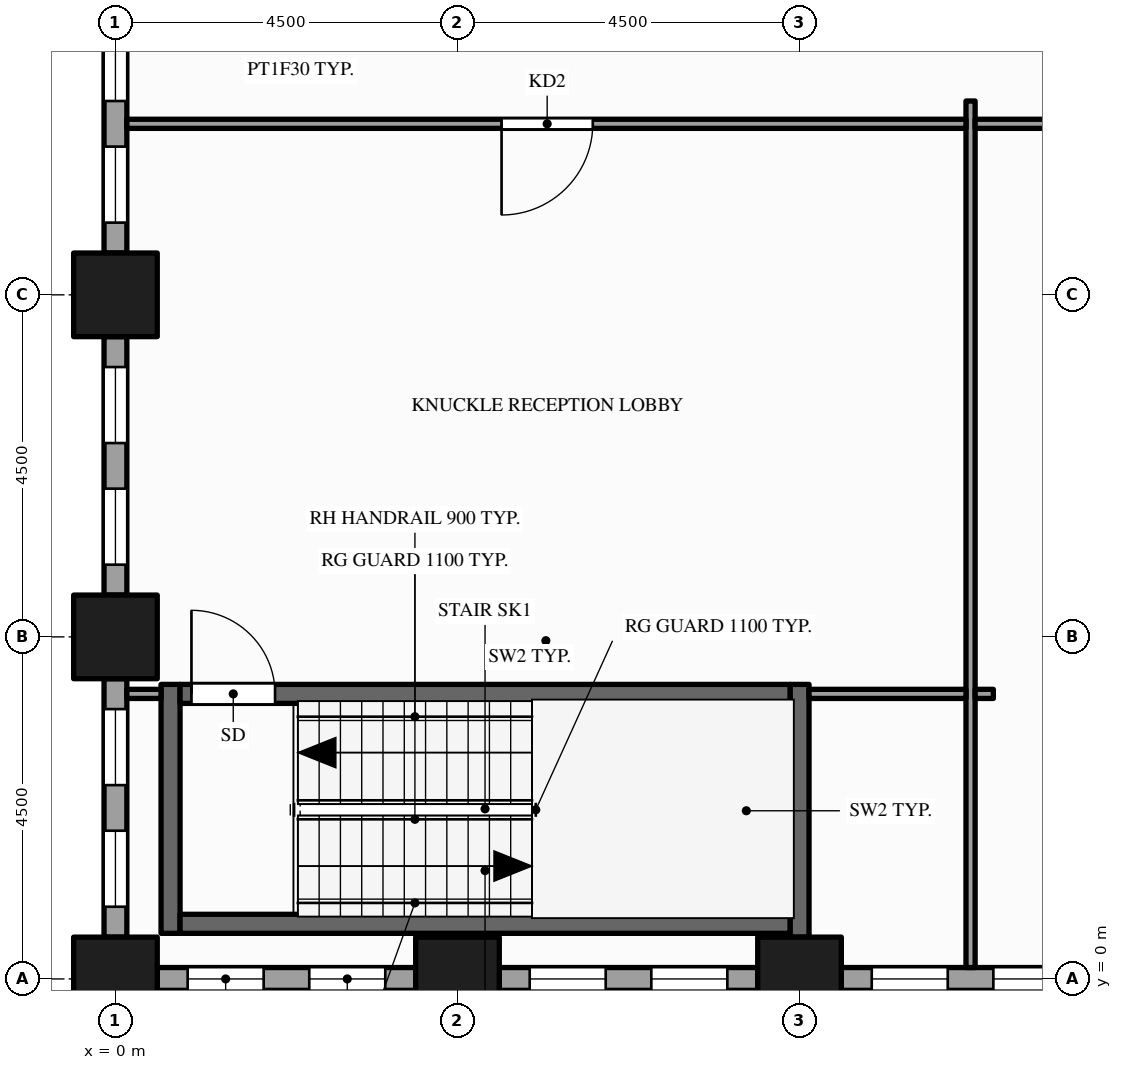
"""IFC4 building model, lengths in metres.
Left out: names, types, materials, properties, quantities, classifications, styles, units other than length and angle.
Written with IfcOpenShell. Run it as: python <this file> out.ifc"""

import sys

from ifc_helpers import new_model, si_unit, direction, frame, frame_2d, origin, origin_2d, place, context, subcontext, project, spatial, rectangle, hollow_rectangle, extrude, element, fill, save


model = new_model("IFC4")
c1 = context("Model", 3, precision=1e-05, world=origin(), true_north=direction((0.0, 1.0)))
c2 = subcontext(c1, "Body", "Model", "MODEL_VIEW")
j1 = project(units=[si_unit("LENGTHUNIT", "METRE"), si_unit("PLANEANGLEUNIT", "RADIAN")], contexts=[c1])
p1 = place(None, origin())
s1 = spatial("IfcSite", under=j1, at=p1, CompositionType="ELEMENT")
p2 = place(p1, origin())
s2 = spatial("IfcBuilding", under=s1, at=p2, CompositionType="ELEMENT")
p3 = place(p2, frame((0.0, 0.0, 41.0)))
s3 = spatial("IfcBuildingStorey", under=s2, at=p3, CompositionType="ELEMENT", Elevation=41.0)
for number, where, z_axis, x_axis in (
    (1, (0.0, 0.0, -0.15), (0.0, 0.0, 1.0), (1.0, 0.0, 0.0)),
    (2, (0.0, 4.5, -0.15), (0.0, 0.0, 1.0), (1.0, 0.0, 0.0)),
    (3, (0.0, 9.0, -0.15), (0.0, 0.0, 1.0), (1.0, 0.0, 0.0)),
    (4, (4.5, 0.0, -0.15), (0.0, 0.0, 1.0), (1.0, 0.0, 0.0)),
    (5, (9.0, 0.0, -0.15), (0.0, 0.0, 1.0), (1.0, 0.0, 0.0)),
):
    element("IfcColumn", number, at=place(p3, frame(where, z_axis=z_axis, x_axis=x_axis)), inside=s3, PredefinedType="COLUMN", context=c2, shape_type="SweptSolid", body=[
        extrude(hollow_rectangle(XDim=1.1, YDim=1.1, WallThickness=0.06, at=origin_2d()), origin(), (0.0, 0.0, 1.0), 4.0),
    ])
p4 = place(p3, frame((0.55, 0.0, 0.0), z_axis=(0.0, 0.0, 1.0), x_axis=(1.0, 0.0, 0.0)))
e6 = element("IfcWall", 6, at=p4, inside=s3, PredefinedType="STANDARD", context=c2, shape_type="SweptSolid", body=[
    extrude(rectangle(XDim=3.4, YDim=0.3, at=frame_2d((1.7, 0.0))), origin(), (0.0, 0.0, 1.0), 3.144),
])
p5 = place(p4, frame((0.4, 0.0, 0.9)))
e7 = element("IfcOpeningElement", 7, at=p5, cuts=e6, PredefinedType="OPENING", context=c2, shape_type="SweptSolid", body=[
    extrude(rectangle(XDim=1.0, YDim=2.0, at=frame_2d((0.5, 1.0))), frame((0.0, 0.16, 0.0), z_axis=(0.0, -1.0, 0.0), x_axis=(1.0, 0.0, 0.0)), (0.0, 0.0, 1.0), 0.32),
])
p6 = place(p4, frame((2.0, 0.0, 0.9)))
e8 = element("IfcOpeningElement", 8, at=p6, cuts=e6, PredefinedType="OPENING", context=c2, shape_type="SweptSolid", body=[
    extrude(rectangle(XDim=1.0, YDim=2.0, at=frame_2d((0.5, 1.0))), frame((0.0, 0.16, 0.0), z_axis=(0.0, -1.0, 0.0), x_axis=(1.0, 0.0, 0.0)), (0.0, 0.0, 1.0), 0.32),
])
p7 = place(p3, frame((5.05, 0.0, 0.0), z_axis=(0.0, 0.0, 1.0), x_axis=(1.0, 0.0, 0.0)))
e9 = element("IfcWall", 9, at=p7, inside=s3, PredefinedType="STANDARD", context=c2, shape_type="SweptSolid", body=[
    extrude(rectangle(XDim=3.4, YDim=0.3, at=frame_2d((1.7, 0.0))), origin(), (0.0, 0.0, 1.0), 3.144),
])
p8 = place(p7, frame((0.4, 0.0, 0.9)))
e10 = element("IfcOpeningElement", 10, at=p8, cuts=e9, PredefinedType="OPENING", context=c2, shape_type="SweptSolid", body=[
    extrude(rectangle(XDim=1.0, YDim=2.0, at=frame_2d((0.5, 1.0))), frame((0.0, 0.16, 0.0), z_axis=(0.0, -1.0, 0.0), x_axis=(1.0, 0.0, 0.0)), (0.0, 0.0, 1.0), 0.32),
])
p9 = place(p7, frame((2.0, 0.0, 0.9)))
e11 = element("IfcOpeningElement", 11, at=p9, cuts=e9, PredefinedType="OPENING", context=c2, shape_type="SweptSolid", body=[
    extrude(rectangle(XDim=1.0, YDim=2.0, at=frame_2d((0.5, 1.0))), frame((0.0, 0.16, 0.0), z_axis=(0.0, -1.0, 0.0), x_axis=(1.0, 0.0, 0.0)), (0.0, 0.0, 1.0), 0.32),
])
p10 = place(p3, frame((9.55, 0.0, 0.0), z_axis=(0.0, 0.0, 1.0), x_axis=(1.0, 0.0, 0.0)))
e12 = element("IfcWall", 12, at=p10, inside=s3, PredefinedType="STANDARD", context=c2, shape_type="SweptSolid", body=[
    extrude(rectangle(XDim=3.4, YDim=0.3, at=frame_2d((1.7, 0.0))), origin(), (0.0, 0.0, 1.0), 3.144),
])
p11 = place(p10, frame((0.4, 0.0, 0.9)))
e13 = element("IfcOpeningElement", 13, at=p11, cuts=e12, PredefinedType="OPENING", context=c2, shape_type="SweptSolid", body=[
    extrude(rectangle(XDim=1.0, YDim=2.0, at=frame_2d((0.5, 1.0))), frame((0.0, 0.16, 0.0), z_axis=(0.0, -1.0, 0.0), x_axis=(1.0, 0.0, 0.0)), (0.0, 0.0, 1.0), 0.32),
])
p12 = place(p10, frame((2.0, 0.0, 0.9)))
e14 = element("IfcOpeningElement", 14, at=p12, cuts=e12, PredefinedType="OPENING", context=c2, shape_type="SweptSolid", body=[
    extrude(rectangle(XDim=1.0, YDim=2.0, at=frame_2d((0.5, 1.0))), frame((0.0, 0.16, 0.0), z_axis=(0.0, -1.0, 0.0), x_axis=(1.0, 0.0, 0.0)), (0.0, 0.0, 1.0), 0.32),
])
p13 = place(p3, frame((0.0, 12.95, 0.0), z_axis=(0.0, 0.0, 1.0), x_axis=(0.0, -1.0, 0.0)))
e15 = element("IfcWall", 15, at=p13, inside=s3, PredefinedType="STANDARD", context=c2, shape_type="SweptSolid", body=[
    extrude(rectangle(XDim=3.4, YDim=0.3, at=frame_2d((1.7, 0.0))), origin(), (0.0, 0.0, 1.0), 3.144),
])
p14 = place(p13, frame((0.4, 0.0, 0.9)))
e16 = element("IfcOpeningElement", 16, at=p14, cuts=e15, PredefinedType="OPENING", context=c2, shape_type="SweptSolid", body=[
    extrude(rectangle(XDim=1.0, YDim=2.0, at=frame_2d((0.5, 1.0))), frame((0.0, 0.16, 0.0), z_axis=(0.0, -1.0, 0.0), x_axis=(1.0, 0.0, 0.0)), (0.0, 0.0, 1.0), 0.32),
])
p15 = place(p13, frame((2.0, 0.0, 0.9)))
e17 = element("IfcOpeningElement", 17, at=p15, cuts=e15, PredefinedType="OPENING", context=c2, shape_type="SweptSolid", body=[
    extrude(rectangle(XDim=1.0, YDim=2.0, at=frame_2d((0.5, 1.0))), frame((0.0, 0.16, 0.0), z_axis=(0.0, -1.0, 0.0), x_axis=(1.0, 0.0, 0.0)), (0.0, 0.0, 1.0), 0.32),
])
p16 = place(p3, frame((0.0, 8.45, 0.0), z_axis=(0.0, 0.0, 1.0), x_axis=(0.0, -1.0, 0.0)))
e18 = element("IfcWall", 18, at=p16, inside=s3, PredefinedType="STANDARD", context=c2, shape_type="SweptSolid", body=[
    extrude(rectangle(XDim=3.4, YDim=0.3, at=frame_2d((1.7, 0.0))), origin(), (0.0, 0.0, 1.0), 3.144),
])
p17 = place(p16, frame((0.4, 0.0, 0.9)))
e19 = element("IfcOpeningElement", 19, at=p17, cuts=e18, PredefinedType="OPENING", context=c2, shape_type="SweptSolid", body=[
    extrude(rectangle(XDim=1.0, YDim=2.0, at=frame_2d((0.5, 1.0))), frame((0.0, 0.16, 0.0), z_axis=(0.0, -1.0, 0.0), x_axis=(1.0, 0.0, 0.0)), (0.0, 0.0, 1.0), 0.32),
])
p18 = place(p16, frame((2.0, 0.0, 0.9)))
e20 = element("IfcOpeningElement", 20, at=p18, cuts=e18, PredefinedType="OPENING", context=c2, shape_type="SweptSolid", body=[
    extrude(rectangle(XDim=1.0, YDim=2.0, at=frame_2d((0.5, 1.0))), frame((0.0, 0.16, 0.0), z_axis=(0.0, -1.0, 0.0), x_axis=(1.0, 0.0, 0.0)), (0.0, 0.0, 1.0), 0.32),
])
p19 = place(p3, frame((0.0, 3.95, 0.0), z_axis=(0.0, 0.0, 1.0), x_axis=(0.0, -1.0, 0.0)))
e21 = element("IfcWall", 21, at=p19, inside=s3, PredefinedType="STANDARD", context=c2, shape_type="SweptSolid", body=[
    extrude(rectangle(XDim=3.4, YDim=0.3, at=frame_2d((1.7, 0.0))), origin(), (0.0, 0.0, 1.0), 3.144),
])
p20 = place(p19, frame((0.4, 0.0, 0.9)))
e22 = element("IfcOpeningElement", 22, at=p20, cuts=e21, PredefinedType="OPENING", context=c2, shape_type="SweptSolid", body=[
    extrude(rectangle(XDim=1.0, YDim=2.0, at=frame_2d((0.5, 1.0))), frame((0.0, 0.16, 0.0), z_axis=(0.0, -1.0, 0.0), x_axis=(1.0, 0.0, 0.0)), (0.0, 0.0, 1.0), 0.32),
])
p21 = place(p19, frame((2.0, 0.0, 0.9)))
e23 = element("IfcOpeningElement", 23, at=p21, cuts=e21, PredefinedType="OPENING", context=c2, shape_type="SweptSolid", body=[
    extrude(rectangle(XDim=1.0, YDim=2.0, at=frame_2d((0.5, 1.0))), frame((0.0, 0.16, 0.0), z_axis=(0.0, -1.0, 0.0), x_axis=(1.0, 0.0, 0.0)), (0.0, 0.0, 1.0), 0.32),
])
p22 = place(p3, frame((0.725, 0.6, 0.0), z_axis=(0.0, 0.0, 1.0), x_axis=(0.0, 1.0, 0.0)))
e24 = element("IfcWall", 24, at=p22, inside=s3, PredefinedType="SHEAR", context=c2, shape_type="SweptSolid", body=[
    extrude(rectangle(XDim=3.275, YDim=0.25, at=frame_2d((1.637, 0.0))), origin(), (0.0, 0.0, 1.0), 3.85),
])
p23 = place(p3, frame((9.0, 0.55, 0.0), z_axis=(0.0, 0.0, 1.0), x_axis=(0.0, 1.0, 0.0)))
e25 = element("IfcWall", 25, at=p23, inside=s3, PredefinedType="SHEAR", context=c2, shape_type="SweptSolid", body=[
    extrude(rectangle(XDim=3.325, YDim=0.25, at=frame_2d((1.663, 0.0))), origin(), (0.0, 0.0, 1.0), 3.85),
])
p24 = place(p3, frame((11.25, 0.15, 0.0), z_axis=(0.0, 0.0, 1.0), x_axis=(0.0, 1.0, 0.0)))
e26 = element("IfcWall", 26, at=p24, inside=s3, PredefinedType="PARTITIONING", context=c2, shape_type="SweptSolid", body=[
    extrude(rectangle(XDim=11.4, YDim=0.12, at=frame_2d((5.7, 0.0))), origin(), (0.0, 0.0, 1.0), 2.938),
])
p25 = place(p3, frame((0.85, 0.725, 0.0), z_axis=(0.0, 0.0, 1.0), x_axis=(1.0, 0.0, 0.0)))
e27 = element("IfcWall", 27, at=p25, inside=s3, PredefinedType="SHEAR", context=c2, shape_type="SweptSolid", body=[
    extrude(rectangle(XDim=8.025, YDim=0.25, at=frame_2d((4.012, 0.0))), origin(), (0.0, 0.0, 1.0), 3.85),
])
p26 = place(p3, frame((0.15, 3.75, 0.0), z_axis=(0.0, 0.0, 1.0), x_axis=(1.0, 0.0, 0.0)))
e28 = element("IfcWall", 28, at=p26, inside=s3, PredefinedType="PARTITIONING", context=c2, shape_type="SweptSolid", body=[
    extrude(rectangle(XDim=0.45, YDim=0.12, at=frame_2d((0.225, 0.0))), origin(), (0.0, 0.0, 1.0), 3.144),
])
p27 = place(p3, frame((0.85, 3.75, 0.0), z_axis=(0.0, 0.0, 1.0), x_axis=(1.0, 0.0, 0.0)))
e29 = element("IfcWall", 29, at=p27, inside=s3, PredefinedType="SHEAR", context=c2, shape_type="SweptSolid", body=[
    extrude(rectangle(XDim=8.025, YDim=0.25, at=frame_2d((4.012, 0.0))), origin(), (0.0, 0.0, 1.0), 3.85),
])
p28 = place(p27, frame((0.15, 0.0, 0.0)))
e30 = element("IfcOpeningElement", 30, at=p28, cuts=e29, PredefinedType="OPENING", context=c2, shape_type="SweptSolid", body=[
    extrude(rectangle(XDim=1.1, YDim=2.1, at=frame_2d((0.55, 1.05))), frame((0.0, 0.135, 0.0), z_axis=(0.0, -1.0, 0.0), x_axis=(1.0, 0.0, 0.0)), (0.0, 0.0, 1.0), 0.27),
])
p29 = place(p3, frame((9.125, 3.75, 0.0), z_axis=(0.0, 0.0, 1.0), x_axis=(1.0, 0.0, 0.0)))
e31 = element("IfcWall", 31, at=p29, inside=s3, PredefinedType="PARTITIONING", context=c2, shape_type="SweptSolid", body=[
    extrude(rectangle(XDim=2.065, YDim=0.12, at=frame_2d((1.032, 0.0))), origin(), (0.0, 0.0, 1.0), 2.938),
])
p30 = place(p3, frame((11.31, 3.75, 0.0), z_axis=(0.0, 0.0, 1.0), x_axis=(1.0, 0.0, 0.0)))
e32 = element("IfcWall", 32, at=p30, inside=s3, PredefinedType="PARTITIONING", context=c2, shape_type="SweptSolid", body=[
    extrude(rectangle(XDim=0.24, YDim=0.12, at=frame_2d((0.12, 0.0))), origin(), (0.0, 0.0, 1.0), 2.938),
])
p31 = place(p3, frame((0.15, 11.25, 0.0), z_axis=(0.0, 0.0, 1.0), x_axis=(1.0, 0.0, 0.0)))
e33 = element("IfcWall", 33, at=p31, inside=s3, PredefinedType="PARTITIONING", context=c2, shape_type="SweptSolid", body=[
    extrude(rectangle(XDim=11.04, YDim=0.12, at=frame_2d((5.52, 0.0))), origin(), (0.0, 0.0, 1.0), 2.938),
])
p32 = place(p31, frame((4.93, 0.0, 0.0)))
e34 = element("IfcOpeningElement", 34, at=p32, cuts=e33, PredefinedType="OPENING", context=c2, shape_type="SweptSolid", body=[
    extrude(rectangle(XDim=1.2, YDim=2.1, at=frame_2d((0.6, 1.05))), frame((0.0, 0.07, 0.0), z_axis=(0.0, -1.0, 0.0), x_axis=(1.0, 0.0, 0.0)), (0.0, 0.0, 1.0), 0.14),
])
p33 = place(p3, frame((11.31, 11.25, 0.0), z_axis=(0.0, 0.0, 1.0), x_axis=(1.0, 0.0, 0.0)))
e35 = element("IfcWall", 35, at=p33, inside=s3, PredefinedType="PARTITIONING", context=c2, shape_type="SweptSolid", body=[
    extrude(rectangle(XDim=4.38, YDim=0.12, at=frame_2d((2.19, 0.0))), origin(), (0.0, 0.0, 1.0), 2.938),
])
p34 = place(p33, frame((1.69, 0.0, 0.0)))
e36 = element("IfcOpeningElement", 36, at=p34, cuts=e35, PredefinedType="OPENING", context=c2, shape_type="SweptSolid", body=[
    extrude(rectangle(XDim=1.0, YDim=2.1, at=frame_2d((0.5, 1.05))), frame((0.0, 0.07, 0.0), z_axis=(0.0, -1.0, 0.0), x_axis=(1.0, 0.0, 0.0)), (0.0, 0.0, 1.0), 0.14),
])
p35 = place(p5, origin())
e37 = element("IfcWindow", 37, at=p35, inside=s3, PartitioningType="SINGLE_PANEL", PredefinedType="WINDOW", context=c2, shape_type="SweptSolid", body=[
    extrude(rectangle(XDim=1.0, YDim=2.0, at=frame_2d((0.5, 1.0))), frame((0.0, 0.03, 0.0), z_axis=(0.0, -1.0, 0.0), x_axis=(1.0, 0.0, 0.0)), (0.0, 0.0, 1.0), 0.06),
])
fill(e7, e37)
p36 = place(p6, origin())
e38 = element("IfcWindow", 38, at=p36, inside=s3, PartitioningType="SINGLE_PANEL", PredefinedType="WINDOW", context=c2, shape_type="SweptSolid", body=[
    extrude(rectangle(XDim=1.0, YDim=2.0, at=frame_2d((0.5, 1.0))), frame((0.0, 0.03, 0.0), z_axis=(0.0, -1.0, 0.0), x_axis=(1.0, 0.0, 0.0)), (0.0, 0.0, 1.0), 0.06),
])
fill(e8, e38)
p37 = place(p8, origin())
e39 = element("IfcWindow", 39, at=p37, inside=s3, PartitioningType="SINGLE_PANEL", PredefinedType="WINDOW", context=c2, shape_type="SweptSolid", body=[
    extrude(rectangle(XDim=1.0, YDim=2.0, at=frame_2d((0.5, 1.0))), frame((0.0, 0.03, 0.0), z_axis=(0.0, -1.0, 0.0), x_axis=(1.0, 0.0, 0.0)), (0.0, 0.0, 1.0), 0.06),
])
fill(e10, e39)
p38 = place(p9, origin())
e40 = element("IfcWindow", 40, at=p38, inside=s3, PartitioningType="SINGLE_PANEL", PredefinedType="WINDOW", context=c2, shape_type="SweptSolid", body=[
    extrude(rectangle(XDim=1.0, YDim=2.0, at=frame_2d((0.5, 1.0))), frame((0.0, 0.03, 0.0), z_axis=(0.0, -1.0, 0.0), x_axis=(1.0, 0.0, 0.0)), (0.0, 0.0, 1.0), 0.06),
])
fill(e11, e40)
p39 = place(p11, origin())
e41 = element("IfcWindow", 41, at=p39, inside=s3, PartitioningType="SINGLE_PANEL", PredefinedType="WINDOW", context=c2, shape_type="SweptSolid", body=[
    extrude(rectangle(XDim=1.0, YDim=2.0, at=frame_2d((0.5, 1.0))), frame((0.0, 0.03, 0.0), z_axis=(0.0, -1.0, 0.0), x_axis=(1.0, 0.0, 0.0)), (0.0, 0.0, 1.0), 0.06),
])
fill(e13, e41)
p40 = place(p12, origin())
e42 = element("IfcWindow", 42, at=p40, inside=s3, PartitioningType="SINGLE_PANEL", PredefinedType="WINDOW", context=c2, shape_type="SweptSolid", body=[
    extrude(rectangle(XDim=1.0, YDim=2.0, at=frame_2d((0.5, 1.0))), frame((0.0, 0.03, 0.0), z_axis=(0.0, -1.0, 0.0), x_axis=(1.0, 0.0, 0.0)), (0.0, 0.0, 1.0), 0.06),
])
fill(e14, e42)
p41 = place(p14, origin())
e43 = element("IfcWindow", 43, at=p41, inside=s3, PartitioningType="SINGLE_PANEL", PredefinedType="WINDOW", context=c2, shape_type="SweptSolid", body=[
    extrude(rectangle(XDim=1.0, YDim=2.0, at=frame_2d((0.5, 1.0))), frame((0.0, 0.03, 0.0), z_axis=(0.0, -1.0, 0.0), x_axis=(1.0, 0.0, 0.0)), (0.0, 0.0, 1.0), 0.06),
])
fill(e16, e43)
p42 = place(p15, origin())
e44 = element("IfcWindow", 44, at=p42, inside=s3, PartitioningType="SINGLE_PANEL", PredefinedType="WINDOW", context=c2, shape_type="SweptSolid", body=[
    extrude(rectangle(XDim=1.0, YDim=2.0, at=frame_2d((0.5, 1.0))), frame((0.0, 0.03, 0.0), z_axis=(0.0, -1.0, 0.0), x_axis=(1.0, 0.0, 0.0)), (0.0, 0.0, 1.0), 0.06),
])
fill(e17, e44)
p43 = place(p17, origin())
e45 = element("IfcWindow", 45, at=p43, inside=s3, PartitioningType="SINGLE_PANEL", PredefinedType="WINDOW", context=c2, shape_type="SweptSolid", body=[
    extrude(rectangle(XDim=1.0, YDim=2.0, at=frame_2d((0.5, 1.0))), frame((0.0, 0.03, 0.0), z_axis=(0.0, -1.0, 0.0), x_axis=(1.0, 0.0, 0.0)), (0.0, 0.0, 1.0), 0.06),
])
fill(e19, e45)
p44 = place(p18, origin())
e46 = element("IfcWindow", 46, at=p44, inside=s3, PartitioningType="SINGLE_PANEL", PredefinedType="WINDOW", context=c2, shape_type="SweptSolid", body=[
    extrude(rectangle(XDim=1.0, YDim=2.0, at=frame_2d((0.5, 1.0))), frame((0.0, 0.03, 0.0), z_axis=(0.0, -1.0, 0.0), x_axis=(1.0, 0.0, 0.0)), (0.0, 0.0, 1.0), 0.06),
])
fill(e20, e46)
p45 = place(p20, origin())
e47 = element("IfcWindow", 47, at=p45, inside=s3, PartitioningType="SINGLE_PANEL", PredefinedType="WINDOW", context=c2, shape_type="SweptSolid", body=[
    extrude(rectangle(XDim=1.0, YDim=2.0, at=frame_2d((0.5, 1.0))), frame((0.0, 0.03, 0.0), z_axis=(0.0, -1.0, 0.0), x_axis=(1.0, 0.0, 0.0)), (0.0, 0.0, 1.0), 0.06),
])
fill(e22, e47)
p46 = place(p21, origin())
e48 = element("IfcWindow", 48, at=p46, inside=s3, PartitioningType="SINGLE_PANEL", PredefinedType="WINDOW", context=c2, shape_type="SweptSolid", body=[
    extrude(rectangle(XDim=1.0, YDim=2.0, at=frame_2d((0.5, 1.0))), frame((0.0, 0.03, 0.0), z_axis=(0.0, -1.0, 0.0), x_axis=(1.0, 0.0, 0.0)), (0.0, 0.0, 1.0), 0.06),
])
fill(e23, e48)
p47 = place(p28, origin())
e49 = element("IfcDoor", 49, at=p47, inside=s3, OperationType="SINGLE_SWING_LEFT", PredefinedType="DOOR", context=c2, shape_type="SweptSolid", body=[
    extrude(rectangle(XDim=1.1, YDim=2.1, at=frame_2d((0.55, 1.05))), frame((0.0, 0.025, 0.0), z_axis=(0.0, -1.0, 0.0), x_axis=(1.0, 0.0, 0.0)), (0.0, 0.0, 1.0), 0.05),
])
fill(e30, e49)
p48 = place(p32, origin())
e50 = element("IfcDoor", 50, at=p48, inside=s3, OperationType="SINGLE_SWING_LEFT", PredefinedType="DOOR", context=c2, shape_type="SweptSolid", body=[
    extrude(rectangle(XDim=1.2, YDim=2.1, at=frame_2d((0.6, 1.05))), frame((0.0, 0.025, 0.0), z_axis=(0.0, -1.0, 0.0), x_axis=(1.0, 0.0, 0.0)), (0.0, 0.0, 1.0), 0.05),
])
fill(e34, e50)
save(model, sys.argv[1])
